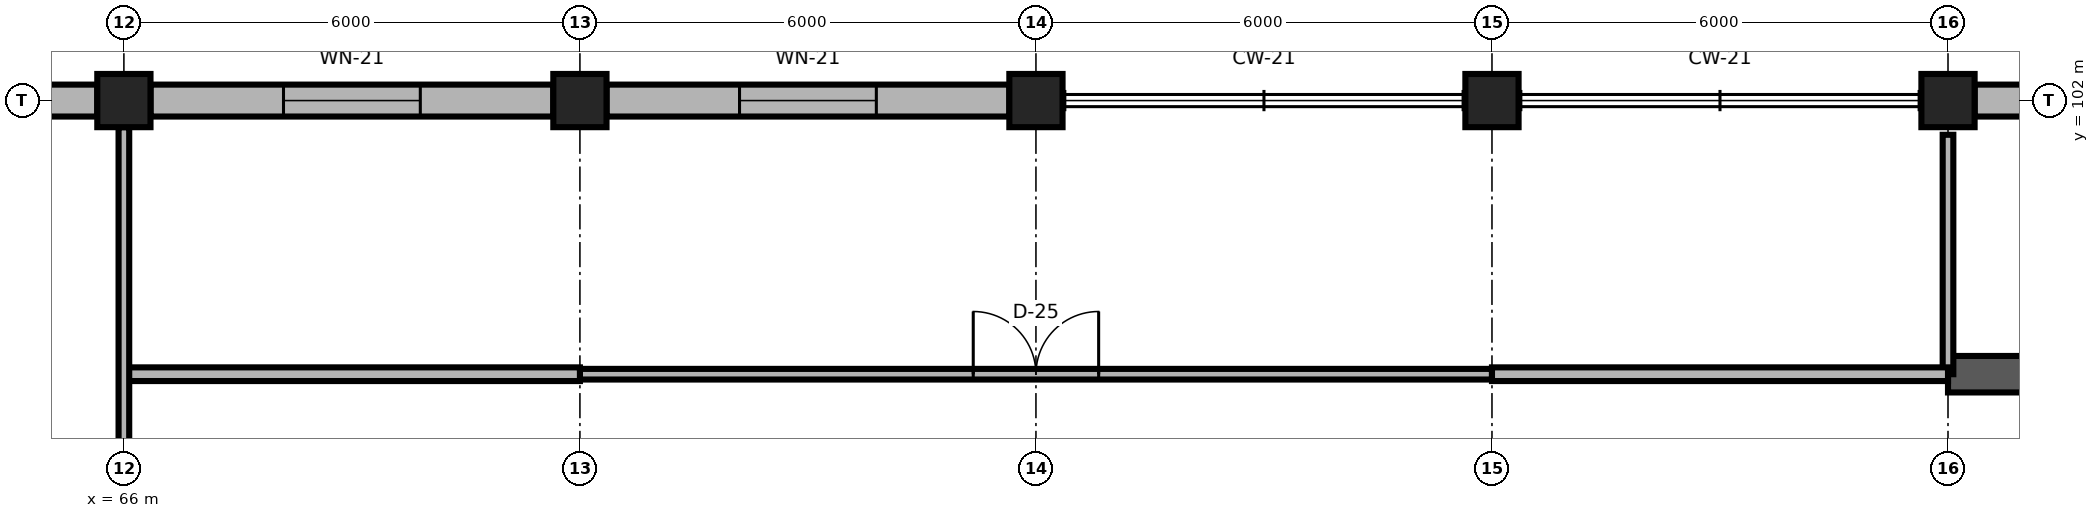
"""IFC4 building model, lengths in metres.
Left out: names, types, materials, properties, quantities, classifications, styles, units other than length and angle.
Written with IfcOpenShell. Run it as: python <this file> out.ifc"""

import sys

from ifc_helpers import new_model, si_unit, direction, frame, frame_2d, origin, origin_2d, place, context, subcontext, project, spatial, rectangle, extrude, element, fill, save


model = new_model("IFC4")
c1 = context("Model", 3, precision=1e-05, world=origin(), true_north=direction((0.0, 1.0)))
c2 = subcontext(c1, "Body", "Model", "MODEL_VIEW")
j1 = project(units=[si_unit("LENGTHUNIT", "METRE"), si_unit("PLANEANGLEUNIT", "RADIAN")], contexts=[c1])
p1 = place(None, origin())
s1 = spatial("IfcSite", under=j1, at=p1, CompositionType="ELEMENT")
p2 = place(p1, origin())
s2 = spatial("IfcBuilding", under=s1, at=p2, CompositionType="ELEMENT")
p3 = place(p2, frame((0.0, 0.0, 52.2)))
s3 = spatial("IfcBuildingStorey", under=s2, at=p3, CompositionType="ELEMENT", Elevation=52.2)
for number, where, z_axis, x_axis in (
    (1, (66.0, 102.0, 0.0), (0.0, 0.0, 1.0), (1.0, 0.0, 0.0)),
    (2, (72.0, 102.0, 0.0), (0.0, 0.0, 1.0), (1.0, 0.0, 0.0)),
    (3, (78.0, 102.0, 0.0), (0.0, 0.0, 1.0), (1.0, 0.0, 0.0)),
    (4, (84.0, 102.0, 0.0), (0.0, 0.0, 1.0), (1.0, 0.0, 0.0)),
    (5, (90.0, 102.0, 0.0), (0.0, 0.0, 1.0), (1.0, 0.0, 0.0)),
):
    element("IfcColumn", number, at=place(p3, frame(where, z_axis=z_axis, x_axis=x_axis)), inside=s3, PredefinedType="COLUMN", context=c2, shape_type="SweptSolid", body=[
        extrude(rectangle(XDim=0.7, YDim=0.7, at=origin_2d()), origin(), (0.0, 0.0, 1.0), 3.9),
    ])
p4 = place(p3, frame((60.35, 102.0, 0.0), z_axis=(0.0, 0.0, 1.0), x_axis=(1.0, 0.0, 0.0)))
e6 = element("IfcWall", 6, at=p4, inside=s3, PredefinedType="SOLIDWALL", context=c2, shape_type="SweptSolid", body=[
    extrude(rectangle(XDim=5.3, YDim=0.42, at=frame_2d((2.65, 0.0))), origin(), (0.0, 0.0, 1.0), 3.32),
])
p5 = place(p4, frame((1.75, 0.0, 0.85)))
e7 = element("IfcOpeningElement", 7, at=p5, cuts=e6, PredefinedType="OPENING", context=c2, shape_type="SweptSolid", body=[
    extrude(rectangle(XDim=1.8, YDim=1.95, at=frame_2d((0.9, 0.975))), frame((0.0, 0.225, 0.0), z_axis=(0.0, -1.0, 0.0), x_axis=(1.0, 0.0, 0.0)), (0.0, 0.0, 1.0), 0.45),
])
p6 = place(p3, frame((66.35, 102.0, 0.0), z_axis=(0.0, 0.0, 1.0), x_axis=(1.0, 0.0, 0.0)))
e8 = element("IfcWall", 8, at=p6, inside=s3, PredefinedType="SOLIDWALL", context=c2, shape_type="SweptSolid", body=[
    extrude(rectangle(XDim=5.3, YDim=0.42, at=frame_2d((2.65, 0.0))), origin(), (0.0, 0.0, 1.0), 3.32),
])
p7 = place(p6, frame((1.75, 0.0, 0.85)))
e9 = element("IfcOpeningElement", 9, at=p7, cuts=e8, PredefinedType="OPENING", context=c2, shape_type="SweptSolid", body=[
    extrude(rectangle(XDim=1.8, YDim=1.95, at=frame_2d((0.9, 0.975))), frame((0.0, 0.225, 0.0), z_axis=(0.0, -1.0, 0.0), x_axis=(1.0, 0.0, 0.0)), (0.0, 0.0, 1.0), 0.45),
])
p8 = place(p3, frame((72.35, 102.0, 0.0), z_axis=(0.0, 0.0, 1.0), x_axis=(1.0, 0.0, 0.0)))
e10 = element("IfcWall", 10, at=p8, inside=s3, PredefinedType="SOLIDWALL", context=c2, shape_type="SweptSolid", body=[
    extrude(rectangle(XDim=5.3, YDim=0.42, at=frame_2d((2.65, 0.0))), origin(), (0.0, 0.0, 1.0), 3.32),
])
p9 = place(p8, frame((1.75, 0.0, 0.85)))
e11 = element("IfcOpeningElement", 11, at=p9, cuts=e10, PredefinedType="OPENING", context=c2, shape_type="SweptSolid", body=[
    extrude(rectangle(XDim=1.8, YDim=1.95, at=frame_2d((0.9, 0.975))), frame((0.0, 0.225, 0.0), z_axis=(0.0, -1.0, 0.0), x_axis=(1.0, 0.0, 0.0)), (0.0, 0.0, 1.0), 0.45),
])
p10 = place(p3, frame((90.35, 102.0, 0.0), z_axis=(0.0, 0.0, 1.0), x_axis=(1.0, 0.0, 0.0)))
e12 = element("IfcWall", 12, at=p10, inside=s3, PredefinedType="SOLIDWALL", context=c2, shape_type="SweptSolid", body=[
    extrude(rectangle(XDim=5.3, YDim=0.42, at=frame_2d((2.65, 0.0))), origin(), (0.0, 0.0, 1.0), 3.32),
])
p11 = place(p10, frame((1.75, 0.0, 0.85)))
e13 = element("IfcOpeningElement", 13, at=p11, cuts=e12, PredefinedType="OPENING", context=c2, shape_type="SweptSolid", body=[
    extrude(rectangle(XDim=1.8, YDim=1.95, at=frame_2d((0.9, 0.975))), frame((0.0, 0.225, 0.0), z_axis=(0.0, -1.0, 0.0), x_axis=(1.0, 0.0, 0.0)), (0.0, 0.0, 1.0), 0.45),
])
p12 = place(p3, frame((72.0, 98.4, 0.0), z_axis=(0.0, 0.0, 1.0), x_axis=(1.0, 0.0, 0.0)))
e14 = element("IfcWall", 14, at=p12, inside=s3, PredefinedType="PARTITIONING", context=c2, shape_type="SweptSolid", body=[
    extrude(rectangle(XDim=12.0, YDim=0.14, at=frame_2d((6.0, 0.0))), origin(), (0.0, 0.0, 1.0), 3.74),
])
p13 = place(p12, frame((5.175, 0.0, 0.0)))
e15 = element("IfcOpeningElement", 15, at=p13, cuts=e14, PredefinedType="OPENING", context=c2, shape_type="SweptSolid", body=[
    extrude(rectangle(XDim=1.65, YDim=2.35, at=frame_2d((0.825, 1.175))), frame((0.0, 0.085, 0.0), z_axis=(0.0, -1.0, 0.0), x_axis=(1.0, 0.0, 0.0)), (0.0, 0.0, 1.0), 0.17),
])
p14 = place(p3, frame((90.0, 98.4, 0.0), z_axis=(0.0, 0.0, 1.0), x_axis=(1.0, 0.0, 0.0)))
e16 = element("IfcWall", 16, at=p14, inside=s3, PredefinedType="SHEAR", context=c2, shape_type="SweptSolid", body=[
    extrude(rectangle(XDim=6.0, YDim=0.48, at=frame_2d((3.0, 0.0))), origin(), (0.0, 0.0, 1.0), 3.74),
])
p15 = place(p14, frame((2.2, 0.0, 0.0)))
e17 = element("IfcOpeningElement", 17, at=p15, cuts=e16, PredefinedType="OPENING", context=c2, shape_type="SweptSolid", body=[
    extrude(rectangle(XDim=1.6, YDim=2.25, at=frame_2d((0.8, 1.125))), frame((0.0, 0.255, 0.0), z_axis=(0.0, -1.0, 0.0), x_axis=(1.0, 0.0, 0.0)), (0.0, 0.0, 1.0), 0.51),
])
p16 = place(p3, frame((90.0, 98.4, 0.0), z_axis=(0.0, 0.0, 1.0), x_axis=(0.0, 1.0, 0.0)))
e18 = element("IfcWall", 18, at=p16, inside=s3, PredefinedType="PARTITIONING", context=c2, shape_type="SweptSolid", body=[
    extrude(rectangle(XDim=3.15, YDim=0.14, at=frame_2d((1.575, 0.0))), origin(), (0.0, 0.0, 1.0), 3.449),
])
for number, where, z_axis, x_axis in (
    (19, (66.0, 98.4, 0.0), (0.0, 0.0, 1.0), (1.0, 0.0, 0.0)),
    (20, (84.0, 98.4, 0.0), (0.0, 0.0, 1.0), (1.0, 0.0, 0.0)),
):
    element("IfcWall", number, at=place(p3, frame(where, z_axis=z_axis, x_axis=x_axis)), inside=s3, PredefinedType="PARTITIONING", context=c2, shape_type="SweptSolid", body=[
        extrude(rectangle(XDim=6.0, YDim=0.18, at=frame_2d((3.0, 0.0))), origin(), (0.0, 0.0, 1.0), 3.74),
    ])
p17 = place(p3, frame((66.0, 96.35, 0.0), z_axis=(0.0, 0.0, 1.0), x_axis=(0.0, 1.0, 0.0)))
e21 = element("IfcWall", 21, at=p17, inside=s3, PredefinedType="PARTITIONING", context=c2, shape_type="SweptSolid", body=[
    extrude(rectangle(XDim=5.3, YDim=0.14, at=frame_2d((2.65, 0.0))), origin(), (0.0, 0.0, 1.0), 3.449),
])
p18 = place(p7, origin())
e22 = element("IfcWindow", 22, at=p18, inside=s3, PartitioningType="SINGLE_PANEL", PredefinedType="WINDOW", context=c2, shape_type="SweptSolid", body=[
    extrude(rectangle(XDim=1.8, YDim=1.95, at=frame_2d((0.9, 0.975))), frame((0.0, 0.03, 0.0), z_axis=(0.0, -1.0, 0.0), x_axis=(1.0, 0.0, 0.0)), (0.0, 0.0, 1.0), 0.06),
])
fill(e9, e22)
p19 = place(p9, origin())
e23 = element("IfcWindow", 23, at=p19, inside=s3, PartitioningType="SINGLE_PANEL", PredefinedType="WINDOW", context=c2, shape_type="SweptSolid", body=[
    extrude(rectangle(XDim=1.8, YDim=1.95, at=frame_2d((0.9, 0.975))), frame((0.0, 0.03, 0.0), z_axis=(0.0, -1.0, 0.0), x_axis=(1.0, 0.0, 0.0)), (0.0, 0.0, 1.0), 0.06),
])
fill(e11, e23)
p20 = place(p13, origin())
e24 = element("IfcDoor", 24, at=p20, inside=s3, OperationType="DOUBLE_DOOR_SINGLE_SWING", PredefinedType="DOOR", context=c2, shape_type="SweptSolid", body=[
    extrude(rectangle(XDim=1.65, YDim=2.35, at=frame_2d((0.825, 1.175))), frame((0.0, 0.025, 0.0), z_axis=(0.0, -1.0, 0.0), x_axis=(1.0, 0.0, 0.0)), (0.0, 0.0, 1.0), 0.05),
])
fill(e15, e24)
save(model, sys.argv[1])
